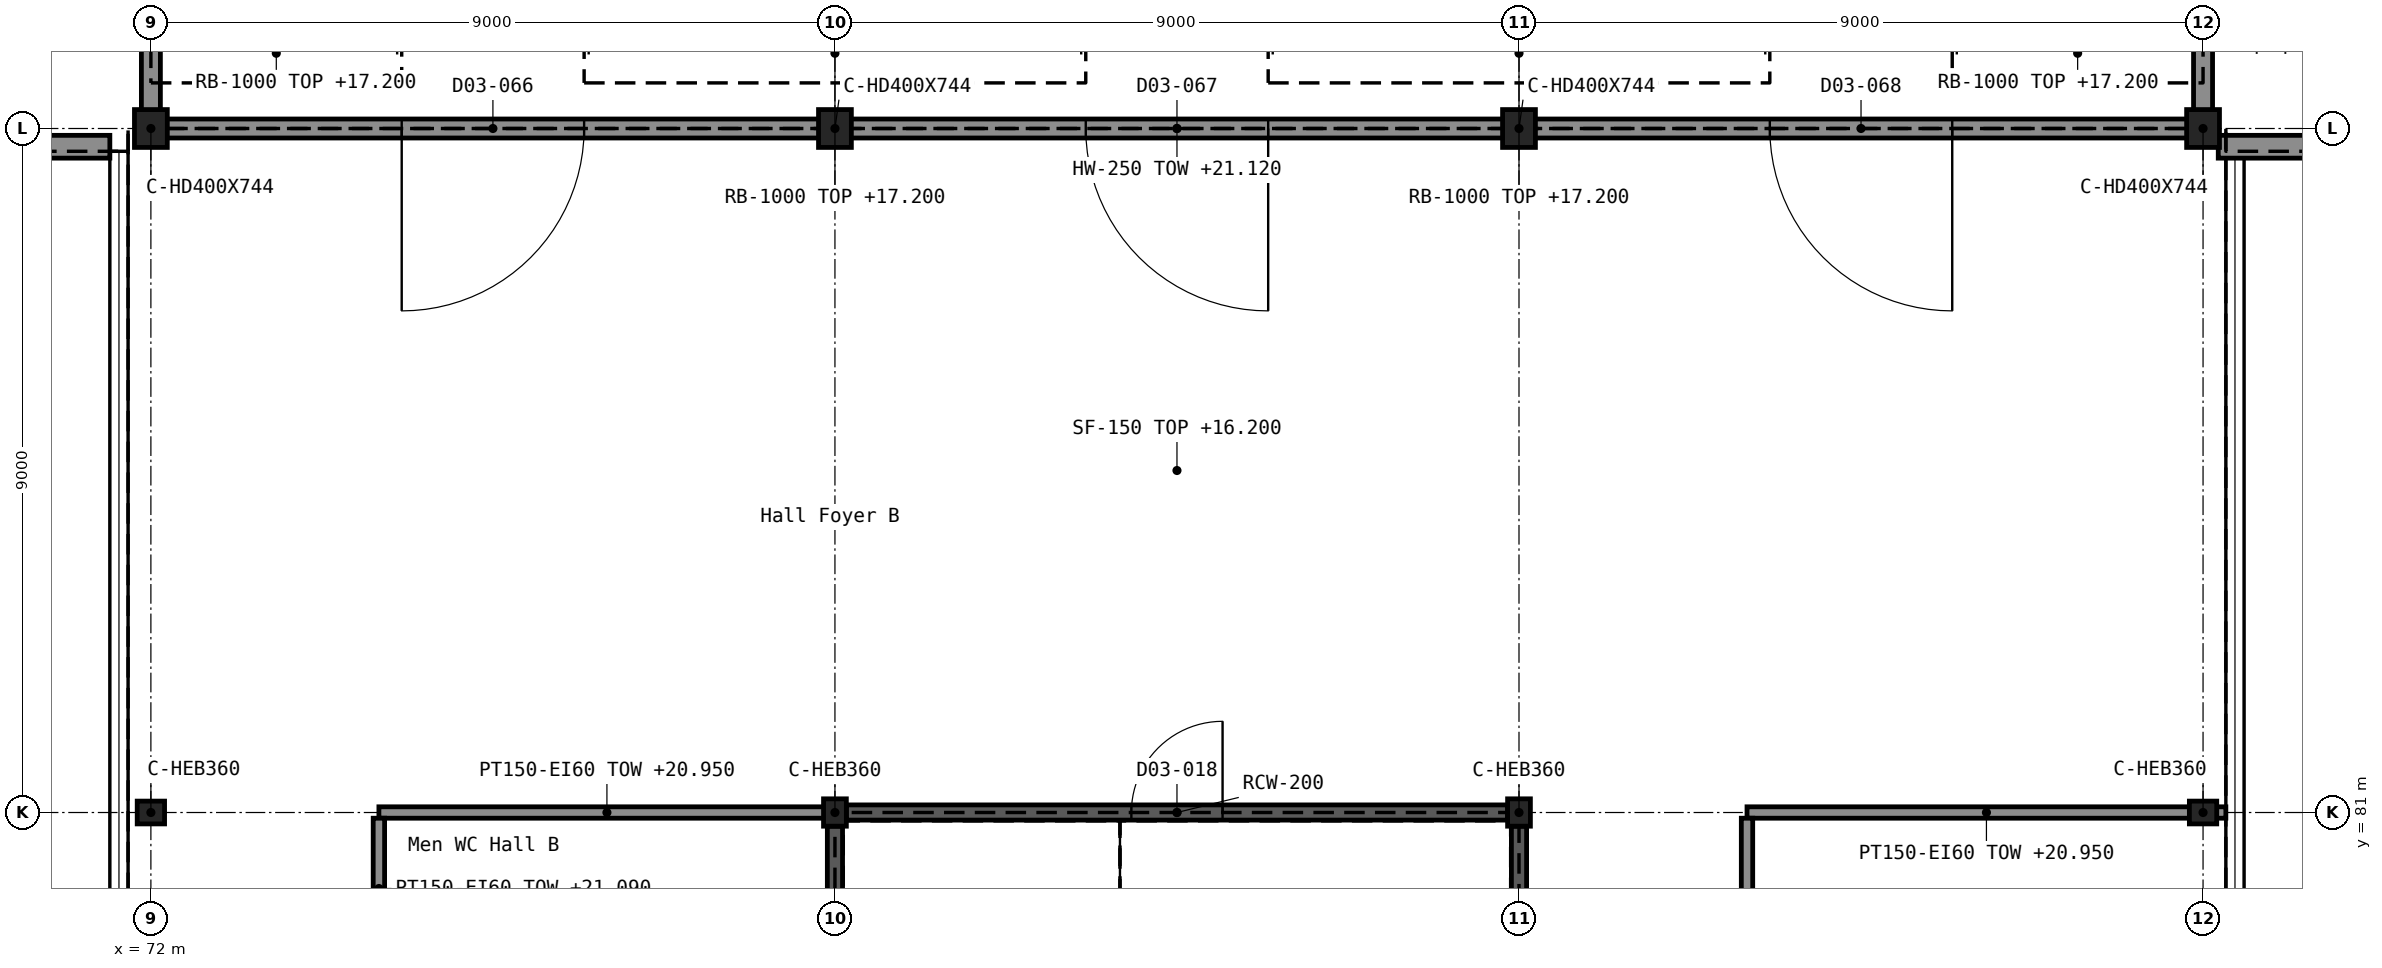
"""IFC4 building model, lengths in metres.
Left out: names, types, materials, properties, quantities, classifications, styles, units other than length and angle.
Written with IfcOpenShell. Run it as: python <this file> out.ifc"""

import sys

from ifc_helpers import new_model, si_unit, direction, frame, frame_2d, origin, origin_2d, place, context, subcontext, project, spatial, rectangle, i_section, extrude, element, fill, save


model = new_model("IFC4")
c1 = context("Model", 3, precision=1e-05, world=origin(), true_north=direction((0.0, 1.0)))
c2 = subcontext(c1, "Body", "Model", "MODEL_VIEW")
j1 = project(units=[si_unit("LENGTHUNIT", "METRE"), si_unit("PLANEANGLEUNIT", "RADIAN")], contexts=[c1])
p1 = place(None, origin())
s1 = spatial("IfcSite", under=j1, at=p1, CompositionType="ELEMENT")
p2 = place(p1, origin())
s2 = spatial("IfcBuilding", under=s1, at=p2, CompositionType="ELEMENT")
p3 = place(p2, frame((0.0, 0.0, 16.2)))
s3 = spatial("IfcBuildingStorey", under=s2, at=p3, CompositionType="ELEMENT", Elevation=16.2)
for number, where, z_axis, x_axis in (
    (1, (72.0, 81.0, 0.0), (0.0, 0.0, 1.0), (0.0, 1.0, 0.0)),
    (2, (81.0, 81.0, 0.0), (0.0, 0.0, 1.0), (1.0, 0.0, 0.0)),
    (3, (90.0, 81.0, 0.0), (0.0, 0.0, 1.0), (1.0, 0.0, 0.0)),
    (4, (99.0, 81.0, 0.0), (0.0, 0.0, 1.0), (0.0, 1.0, 0.0)),
):
    element("IfcColumn", number, at=place(p3, frame(where, z_axis=z_axis, x_axis=x_axis)), inside=s3, PredefinedType="COLUMN", context=c2, shape_type="SweptSolid", body=[
        extrude(i_section(OverallWidth=0.3, OverallDepth=0.36, WebThickness=0.012, FlangeThickness=0.022, FilletRadius=0.027, at=origin_2d()), origin(), (0.0, 0.0, 1.0), 5.4),
    ])
for number, where, z_axis, x_axis in (
    (5, (72.0, 90.0, 0.0), (0.0, 0.0, 1.0), (1.0, 0.0, 0.0)),
    (6, (81.0, 90.0, 0.0), (0.0, 0.0, 1.0), (1.0, 0.0, 0.0)),
    (7, (90.0, 90.0, 0.0), (0.0, 0.0, 1.0), (1.0, 0.0, 0.0)),
    (8, (99.0, 90.0, 0.0), (0.0, 0.0, 1.0), (1.0, 0.0, 0.0)),
):
    element("IfcColumn", number, at=place(p3, frame(where, z_axis=z_axis, x_axis=x_axis)), inside=s3, PredefinedType="COLUMN", context=c2, shape_type="SweptSolid", body=[
        extrude(i_section(OverallWidth=0.432, OverallDepth=0.498, WebThickness=0.056, FlangeThickness=0.089, FilletRadius=0.015, at=origin_2d()), origin(), (0.0, 0.0, 1.0), 5.4),
    ])
p4 = place(p3, frame((63.2, 89.76, 0.0), z_axis=(0.0, 0.0, 1.0), x_axis=(1.0, 0.0, 0.0)))
e9 = element("IfcWall", 9, at=p4, inside=s3, PredefinedType="SOLIDWALL", context=c2, shape_type="SweptSolid", body=[
    extrude(rectangle(XDim=8.26, YDim=0.3, at=frame_2d((4.13, 0.0))), origin(), (0.0, 0.0, 1.0), 5.4),
])
p5 = place(p3, frame((99.2, 89.76, 0.0), z_axis=(0.0, 0.0, 1.0), x_axis=(1.0, 0.0, 0.0)))
e10 = element("IfcWall", 10, at=p5, inside=s3, PredefinedType="SOLIDWALL", context=c2, shape_type="SweptSolid", body=[
    extrude(rectangle(XDim=8.6, YDim=0.3, at=frame_2d((4.3, 0.0))), origin(), (0.0, 0.0, 1.0), 5.4),
])
p6 = place(p3, frame((81.15, 81.0, 0.0), z_axis=(0.0, 0.0, 1.0), x_axis=(1.0, 0.0, 0.0)))
e11 = element("IfcWall", 11, at=p6, inside=s3, PredefinedType="SHEAR", context=c2, shape_type="SweptSolid", body=[
    extrude(rectangle(XDim=8.7, YDim=0.2, at=frame_2d((4.35, 0.0))), origin(), (0.0, 0.0, 1.0), 5.4),
])
p7 = place(p6, frame((3.75, 0.0, 0.0)))
e12 = element("IfcOpeningElement", 12, at=p7, cuts=e11, PredefinedType="OPENING", context=c2, shape_type="SweptSolid", body=[
    extrude(rectangle(XDim=1.2, YDim=2.1, at=frame_2d((0.6, 1.05))), frame((0.0, 0.111, 0.0), z_axis=(0.0, -1.0, 0.0), x_axis=(1.0, 0.0, 0.0)), (0.0, 0.0, 1.0), 0.222),
])
for number, where, z_axis, x_axis in (
    (13, (81.0, 72.18, 0.0), (0.0, 0.0, 1.0), (0.0, 1.0, 0.0)),
    (14, (90.0, 72.18, 0.0), (0.0, 0.0, 1.0), (0.0, 1.0, 0.0)),
):
    element("IfcWall", number, at=place(p3, frame(where, z_axis=z_axis, x_axis=x_axis)), inside=s3, PredefinedType="SHEAR", context=c2, shape_type="SweptSolid", body=[
        extrude(rectangle(XDim=8.64, YDim=0.2, at=frame_2d((4.32, 0.0))), origin(), (0.0, 0.0, 1.0), 5.4),
    ])
p8 = place(p3, frame((72.0, 90.0, 0.0), z_axis=(0.0, 0.0, 1.0), x_axis=(1.0, 0.0, 0.0)))
e15 = element("IfcWall", 15, at=p8, inside=s3, PredefinedType="SOLIDWALL", context=c2, shape_type="SweptSolid", body=[
    extrude(rectangle(XDim=27.0, YDim=0.25, at=frame_2d((13.5, 0.0))), origin(), (0.0, 0.0, 1.0), 4.92),
])
p9 = place(p8, frame((3.3, 0.0, 0.0)))
e16 = element("IfcOpeningElement", 16, at=p9, cuts=e15, PredefinedType="OPENING", context=c2, shape_type="SweptSolid", body=[
    extrude(rectangle(XDim=2.4, YDim=2.4, at=frame_2d((1.2, 1.2))), frame((0.0, 0.136, 0.0), z_axis=(0.0, -1.0, 0.0), x_axis=(1.0, 0.0, 0.0)), (0.0, 0.0, 1.0), 0.272),
])
p10 = place(p8, frame((12.3, 0.0, 0.0)))
e17 = element("IfcOpeningElement", 17, at=p10, cuts=e15, PredefinedType="OPENING", context=c2, shape_type="SweptSolid", body=[
    extrude(rectangle(XDim=2.4, YDim=2.4, at=frame_2d((1.2, 1.2))), frame((0.0, 0.136, 0.0), z_axis=(0.0, -1.0, 0.0), x_axis=(1.0, 0.0, 0.0)), (0.0, 0.0, 1.0), 0.272),
])
p11 = place(p8, frame((21.3, 0.0, 0.0)))
e18 = element("IfcOpeningElement", 18, at=p11, cuts=e15, PredefinedType="OPENING", context=c2, shape_type="SweptSolid", body=[
    extrude(rectangle(XDim=2.4, YDim=2.4, at=frame_2d((1.2, 1.2))), frame((0.0, 0.136, 0.0), z_axis=(0.0, -1.0, 0.0), x_axis=(1.0, 0.0, 0.0)), (0.0, 0.0, 1.0), 0.272),
])
for number, where, z_axis, x_axis in (
    (19, (72.0, 90.125, 0.0), (0.0, 0.0, 1.0), (0.0, 1.0, 0.0)),
    (20, (99.0, 90.125, 0.0), (0.0, 0.0, 1.0), (0.0, 1.0, 0.0)),
):
    element("IfcWall", number, at=place(p3, frame(where, z_axis=z_axis, x_axis=x_axis)), inside=s3, PredefinedType="SOLIDWALL", context=c2, shape_type="SweptSolid", body=[
        extrude(rectangle(XDim=4.25, YDim=0.25, at=frame_2d((2.125, 0.0))), origin(), (0.0, 0.0, 1.0), 5.25),
    ])
p12 = place(p3, frame((75.0, 81.0, 0.0), z_axis=(0.0, 0.0, 1.0), x_axis=(1.0, 0.0, 0.0)))
e21 = element("IfcWall", 21, at=p12, inside=s3, PredefinedType="PARTITIONING", context=c2, shape_type="SweptSolid", body=[
    extrude(rectangle(XDim=6.0, YDim=0.15, at=frame_2d((3.0, 0.0))), origin(), (0.0, 0.0, 1.0), 4.75),
])
p13 = place(p3, frame((93.0, 81.0, 0.0), z_axis=(0.0, 0.0, 1.0), x_axis=(1.0, 0.0, 0.0)))
e22 = element("IfcWall", 22, at=p13, inside=s3, PredefinedType="PARTITIONING", context=c2, shape_type="SweptSolid", body=[
    extrude(rectangle(XDim=6.3, YDim=0.15, at=frame_2d((3.15, 0.0))), origin(), (0.0, 0.0, 1.0), 4.75),
])
p14 = place(p3, frame((75.0, 79.075, 0.0), z_axis=(0.0, 0.0, 1.0), x_axis=(0.0, 1.0, 0.0)))
e23 = element("IfcWall", 23, at=p14, inside=s3, PredefinedType="PARTITIONING", context=c2, shape_type="SweptSolid", body=[
    extrude(rectangle(XDim=1.85, YDim=0.15, at=frame_2d((0.925, 0.0))), origin(), (0.0, 0.0, 1.0), 4.89),
])
p15 = place(p3, frame((93.0, 72.075, 0.0), z_axis=(0.0, 0.0, 1.0), x_axis=(0.0, 1.0, 0.0)))
e24 = element("IfcWall", 24, at=p15, inside=s3, PredefinedType="PARTITIONING", context=c2, shape_type="SweptSolid", body=[
    extrude(rectangle(XDim=8.85, YDim=0.15, at=frame_2d((4.425, 0.0))), origin(), (0.0, 0.0, 1.0), 4.89),
])
p16 = place(p15, frame((3.525, 0.0, 0.0)))
e25 = element("IfcOpeningElement", 25, at=p16, cuts=e24, PredefinedType="OPENING", context=c2, shape_type="SweptSolid", body=[
    extrude(rectangle(XDim=1.8, YDim=3.0, at=frame_2d((0.9, 1.5))), frame((0.0, 0.086, 0.0), z_axis=(0.0, -1.0, 0.0), x_axis=(1.0, 0.0, 0.0)), (0.0, 0.0, 1.0), 0.172),
])
p17 = place(p7, origin())
e26 = element("IfcDoor", 26, at=p17, inside=s3, OperationType="SINGLE_SWING_RIGHT", PredefinedType="DOOR", context=c2, shape_type="SweptSolid", body=[
    extrude(rectangle(XDim=1.2, YDim=2.1, at=frame_2d((0.6, 1.05))), frame((0.0, 0.025, 0.0), z_axis=(0.0, -1.0, 0.0), x_axis=(1.0, 0.0, 0.0)), (0.0, 0.0, 1.0), 0.05),
])
fill(e12, e26)
p18 = place(p9, frame((2.4, 0.0, 0.0), z_axis=(0.0, 0.0, 1.0), x_axis=(-1.0, 0.0, 0.0)))
e27 = element("IfcDoor", 27, at=p18, inside=s3, OperationType="DOUBLE_DOOR_SINGLE_SWING", PredefinedType="DOOR", context=c2, shape_type="SweptSolid", body=[
    extrude(rectangle(XDim=2.4, YDim=2.4, at=frame_2d((1.2, 1.2))), frame((0.0, 0.025, 0.0), z_axis=(0.0, -1.0, 0.0), x_axis=(1.0, 0.0, 0.0)), (0.0, 0.0, 1.0), 0.05),
])
fill(e16, e27)
p19 = place(p10, frame((2.4, 0.0, 0.0), z_axis=(0.0, 0.0, 1.0), x_axis=(-1.0, 0.0, 0.0)))
e28 = element("IfcDoor", 28, at=p19, inside=s3, OperationType="DOUBLE_DOOR_SINGLE_SWING", PredefinedType="DOOR", context=c2, shape_type="SweptSolid", body=[
    extrude(rectangle(XDim=2.4, YDim=2.4, at=frame_2d((1.2, 1.2))), frame((0.0, 0.025, 0.0), z_axis=(0.0, -1.0, 0.0), x_axis=(1.0, 0.0, 0.0)), (0.0, 0.0, 1.0), 0.05),
])
fill(e17, e28)
p20 = place(p11, frame((2.4, 0.0, 0.0), z_axis=(0.0, 0.0, 1.0), x_axis=(-1.0, 0.0, 0.0)))
e29 = element("IfcDoor", 29, at=p20, inside=s3, OperationType="DOUBLE_DOOR_SINGLE_SWING", PredefinedType="DOOR", context=c2, shape_type="SweptSolid", body=[
    extrude(rectangle(XDim=2.4, YDim=2.4, at=frame_2d((1.2, 1.2))), frame((0.0, 0.025, 0.0), z_axis=(0.0, -1.0, 0.0), x_axis=(1.0, 0.0, 0.0)), (0.0, 0.0, 1.0), 0.05),
])
fill(e18, e29)
save(model, sys.argv[1])
